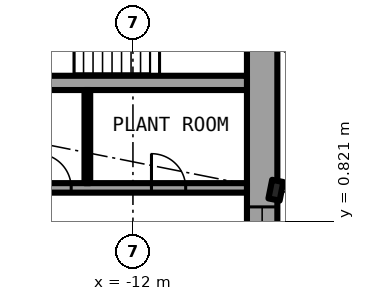
"""IFC4 building model, lengths in metres.
Left out: names, types, materials, properties, quantities, classifications, styles, units other than length and angle.
Written with IfcOpenShell. Run it as: python <this file> out.ifc"""

import sys

from ifc_helpers import new_model, si_unit, direction, frame, frame_2d, origin, origin_2d, place, context, subcontext, project, spatial, rectangle, i_section, extrude, element, fill, save


model = new_model("IFC4")
c1 = context("Model", 3, precision=1e-05, world=origin(), true_north=direction((0.0, 1.0)))
c2 = subcontext(c1, "Body", "Model", "MODEL_VIEW")
j1 = project(units=[si_unit("LENGTHUNIT", "METRE"), si_unit("PLANEANGLEUNIT", "RADIAN")], contexts=[c1])
p1 = place(None, origin())
s1 = spatial("IfcSite", under=j1, at=p1, CompositionType="ELEMENT")
p2 = place(p1, origin())
s2 = spatial("IfcBuilding", under=s1, at=p2, CompositionType="ELEMENT")
p3 = place(p2, frame((0.0, 0.0, 22.8)))
s3 = spatial("IfcBuildingStorey", under=s2, at=p3, CompositionType="ELEMENT", Elevation=22.8)
p4 = place(p3, frame((-8.239, 1.639, 0.0), z_axis=(0.0, 0.0, 1.0), x_axis=(-0.980785280403, 0.195090322016, 0.0)))
e1 = element("IfcColumn", 1, at=p4, inside=s3, PredefinedType="COLUMN", context=c2, shape_type="SweptSolid", body=[
    extrude(i_section(OverallWidth=0.3, OverallDepth=0.5, WebThickness=0.014, FlangeThickness=0.028, FilletRadius=0.027, at=origin_2d()), origin(), (0.0, 0.0, 1.0), 3.05),
])
p5 = place(p3, frame((-8.6, 8.6, 0.0), z_axis=(0.0, 0.0, 1.0), x_axis=(0.0, -1.0, 0.0)))
e2 = element("IfcWall", 2, at=p5, inside=s3, PredefinedType="SHEAR", context=c2, shape_type="SweptSolid", body=[
    extrude(rectangle(XDim=17.2, YDim=0.8, at=frame_2d((8.6, 0.0))), origin(), (0.0, 0.0, 1.0), 3.05),
])
p6 = place(p5, frame((7.4, 0.0, 0.1)))
e3 = element("IfcOpeningElement", 3, at=p6, cuts=e2, PredefinedType="OPENING", context=c2, shape_type="SweptSolid", body=[
    extrude(rectangle(XDim=2.4, YDim=2.2, at=frame_2d((1.2, 1.1))), frame((0.0, 0.41, 0.0), z_axis=(0.0, -1.0, 0.0), x_axis=(1.0, 0.0, 0.0)), (0.0, 0.0, 1.0), 0.82),
])
p7 = place(p3, frame((-19.15, 1.7, 0.0), z_axis=(0.0, 0.0, 1.0), x_axis=(1.0, 0.0, 0.0)))
e4 = element("IfcWall", 4, at=p7, inside=s3, PredefinedType="SHEAR", context=c2, shape_type="SweptSolid", body=[
    extrude(rectangle(XDim=10.15, YDim=0.25, at=frame_2d((5.075, 0.0))), origin(), (0.0, 0.0, 1.0), 3.05),
])
p8 = place(p7, frame((2.45, 0.0, 0.0)))
e5 = element("IfcOpeningElement", 5, at=p8, cuts=e4, PredefinedType="OPENING", context=c2, shape_type="SweptSolid", body=[
    extrude(rectangle(XDim=1.1, YDim=2.3, at=frame_2d((0.55, 1.15))), frame((0.0, 0.135, 0.0), z_axis=(0.0, -1.0, 0.0), x_axis=(1.0, 0.0, 0.0)), (0.0, 0.0, 1.0), 0.27),
])
p9 = place(p7, frame((7.637, 0.0, 0.0)))
e6 = element("IfcOpeningElement", 6, at=p9, cuts=e4, PredefinedType="OPENING", context=c2, shape_type="SweptSolid", body=[
    extrude(rectangle(XDim=0.9, YDim=2.3, at=frame_2d((0.45, 1.15))), frame((0.0, 0.135, 0.0), z_axis=(0.0, -1.0, 0.0), x_axis=(1.0, 0.0, 0.0)), (0.0, 0.0, 1.0), 0.27),
])
p10 = place(p7, frame((4.625, 0.0, 0.0)))
e7 = element("IfcOpeningElement", 7, at=p10, cuts=e4, PredefinedType="OPENING", context=c2, shape_type="SweptSolid", body=[
    extrude(rectangle(XDim=0.9, YDim=2.3, at=frame_2d((0.45, 1.15))), frame((0.0, 0.135, 0.0), z_axis=(0.0, -1.0, 0.0), x_axis=(1.0, 0.0, 0.0)), (0.0, 0.0, 1.0), 0.27),
])
p11 = place(p3, frame((-9.0, 4.462, 0.0), z_axis=(0.0, 0.0, 1.0), x_axis=(-1.0, 0.0, 0.0)))
e8 = element("IfcWall", 8, at=p11, inside=s3, PredefinedType="SHEAR", context=c2, shape_type="SweptSolid", body=[
    extrude(rectangle(XDim=10.15, YDim=0.375, at=frame_2d((5.075, 0.0))), origin(), (0.0, 0.0, 1.0), 3.05),
])
p12 = place(p3, frame((-13.2, 1.825, 0.0), z_axis=(0.0, 0.0, 1.0), x_axis=(0.0, 1.0, 0.0)))
e9 = element("IfcWall", 9, at=p12, inside=s3, PredefinedType="PARTITIONING", context=c2, shape_type="SweptSolid", body=[
    extrude(rectangle(XDim=2.45, YDim=0.15, at=frame_2d((1.225, 0.0))), origin(), (0.0, 0.0, 1.0), 2.7),
])
p13 = place(p3, frame((-6.513, 4.472, 0.0), z_axis=(0.0, 0.0, 1.0), x_axis=(-0.831417956244, 0.555647533996, 0.0)))
e10 = element("IfcWall", 10, at=p13, inside=s3, PredefinedType="PARTITIONING", context=c2, shape_type="SweptSolid", body=[
    extrude(rectangle(XDim=1.962, YDim=0.2, at=frame_2d((0.981, 0.0))), origin(), (0.0, 0.0, 1.0), 2.7),
])
p14 = place(p9, origin())
e11 = element("IfcDoor", 11, at=p14, inside=s3, OperationType="SINGLE_SWING_LEFT", PredefinedType="DOOR", context=c2, shape_type="SweptSolid", body=[
    extrude(rectangle(XDim=0.9, YDim=2.3, at=frame_2d((0.45, 1.15))), frame((0.0, 0.025, 0.0), z_axis=(0.0, -1.0, 0.0), x_axis=(1.0, 0.0, 0.0)), (0.0, 0.0, 1.0), 0.05),
])
fill(e6, e11)
p15 = place(p10, origin())
e12 = element("IfcDoor", 12, at=p15, inside=s3, OperationType="SINGLE_SWING_LEFT", PredefinedType="DOOR", context=c2, shape_type="SweptSolid", body=[
    extrude(rectangle(XDim=0.9, YDim=2.3, at=frame_2d((0.45, 1.15))), frame((0.0, 0.025, 0.0), z_axis=(0.0, -1.0, 0.0), x_axis=(1.0, 0.0, 0.0)), (0.0, 0.0, 1.0), 0.05),
])
fill(e7, e12)
p16 = place(p6, origin())
e13 = element("IfcWindow", 13, at=p16, inside=s3, PartitioningType="SINGLE_PANEL", PredefinedType="WINDOW", context=c2, shape_type="SweptSolid", body=[
    extrude(rectangle(XDim=2.4, YDim=2.2, at=frame_2d((1.2, 1.1))), frame((0.0, 0.03, 0.0), z_axis=(0.0, -1.0, 0.0), x_axis=(1.0, 0.0, 0.0)), (0.0, 0.0, 1.0), 0.06),
])
fill(e3, e13)
save(model, sys.argv[1])
